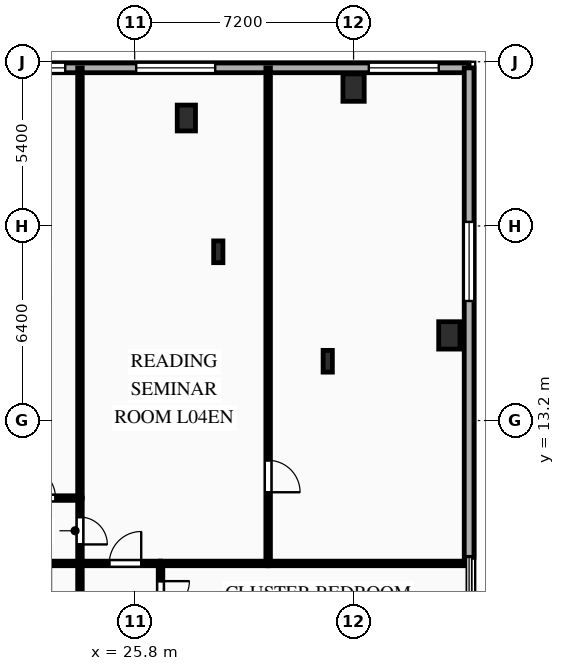
"""IFC4 building model, lengths in metres.
Left out: names, types, materials, properties, quantities, classifications, styles, units other than length and angle.
Written with IfcOpenShell. Run it as: python <this file> out.ifc"""

import sys

from ifc_helpers import new_model, si_unit, direction, frame, frame_2d, origin, origin_2d, place, context, subcontext, project, spatial, rectangle, i_section, extrude, element, fill, save


model = new_model("IFC4")
c1 = context("Model", 3, precision=1e-05, world=origin(), true_north=direction((0.0, 1.0)))
c2 = subcontext(c1, "Body", "Model", "MODEL_VIEW")
j1 = project(units=[si_unit("LENGTHUNIT", "METRE"), si_unit("PLANEANGLEUNIT", "RADIAN")], contexts=[c1])
p1 = place(None, origin())
s1 = spatial("IfcSite", under=j1, at=p1, CompositionType="ELEMENT")
p2 = place(p1, origin())
s2 = spatial("IfcBuilding", under=s1, at=p2, CompositionType="ELEMENT")
p3 = place(p2, frame((0.0, 0.0, 18.0)))
s3 = spatial("IfcBuildingStorey", under=s2, at=p3, CompositionType="ELEMENT", Elevation=18.0)
for number, where, z_axis, x_axis in (
    (1, (33.0, 24.15, 0.0), (0.0, 0.0, 1.0), (1.0, 0.0, 0.0)),
    (2, (36.15, 16.0, 0.0), (0.0, 0.0, 1.0), (1.0, 0.0, 0.0)),
):
    element("IfcColumn", number, at=place(p3, frame(where, z_axis=z_axis, x_axis=x_axis)), inside=s3, PredefinedType="COLUMN", context=c2, shape_type="SweptSolid", body=[
        extrude(rectangle(XDim=0.7, YDim=0.9, at=origin_2d()), origin(), (0.0, 0.0, 1.0), 4.5),
    ])
p4 = place(p3, frame((27.5, 23.15, 0.0), z_axis=(0.0, 0.0, 1.0), x_axis=(1.0, 0.0, 0.0)))
e3 = element("IfcColumn", 3, at=p4, inside=s3, PredefinedType="PILASTER", context=c2, shape_type="SweptSolid", body=[
    extrude(rectangle(XDim=0.6, YDim=0.85, at=origin_2d()), origin(), (0.0, 0.0, 1.0), 4.5),
])
for number, where, z_axis, x_axis in (
    (4, (28.55, 18.75, 0.0), (0.0, 0.0, 1.0), (1.0, 0.0, 0.0)),
    (5, (32.15, 15.15, 0.0), (0.0, 0.0, 1.0), (1.0, 0.0, 0.0)),
):
    element("IfcColumn", number, at=place(p3, frame(where, z_axis=z_axis, x_axis=x_axis)), inside=s3, PredefinedType="COLUMN", context=c2, shape_type="SweptSolid", body=[
        extrude(i_section(OverallWidth=0.304, OverallDepth=0.716, WebThickness=0.021, FlangeThickness=0.04, FilletRadius=0.027, at=origin_2d()), origin(), (0.0, 0.0, 1.0), 4.5),
    ])
p5 = place(p3, frame((-36.8, 24.8, 0.0), z_axis=(0.0, 0.0, 1.0), x_axis=(1.0, 0.0, 0.0)))
e6 = element("IfcWall", 6, at=p5, inside=s3, PredefinedType="SOLIDWALL", context=c2, shape_type="SweptSolid", body=[
    extrude(rectangle(XDim=73.6, YDim=0.32, at=frame_2d((36.8, 0.0))), origin(), (0.0, 0.0, 1.0), 4.17),
])
p6 = place(p5, frame((1.079, 0.0, 0.85)))
e7 = element("IfcOpeningElement", 7, at=p6, cuts=e6, PredefinedType="OPENING", context=c2, shape_type="SweptSolid", body=[
    extrude(rectangle(XDim=2.3, YDim=2.4, at=frame_2d((1.15, 1.2))), frame((0.0, 0.17, 0.0), z_axis=(0.0, -1.0, 0.0), x_axis=(1.0, 0.0, 0.0)), (0.0, 0.0, 1.0), 0.34),
])
p7 = place(p5, frame((8.431, 0.0, 0.85)))
e8 = element("IfcOpeningElement", 8, at=p7, cuts=e6, PredefinedType="OPENING", context=c2, shape_type="SweptSolid", body=[
    extrude(rectangle(XDim=2.6, YDim=2.4, at=frame_2d((1.3, 1.2))), frame((0.0, 0.17, 0.0), z_axis=(0.0, -1.0, 0.0), x_axis=(1.0, 0.0, 0.0)), (0.0, 0.0, 1.0), 0.34),
])
p8 = place(p5, frame((15.168, 0.0, 0.85)))
e9 = element("IfcOpeningElement", 9, at=p8, cuts=e6, PredefinedType="OPENING", context=c2, shape_type="SweptSolid", body=[
    extrude(rectangle(XDim=1.1, YDim=1.85, at=frame_2d((0.55, 0.925))), frame((0.0, 0.17, 0.0), z_axis=(0.0, -1.0, 0.0), x_axis=(1.0, 0.0, 0.0)), (0.0, 0.0, 1.0), 0.34),
])
p9 = place(p5, frame((17.521, 0.0, 0.85)))
e10 = element("IfcOpeningElement", 10, at=p9, cuts=e6, PredefinedType="OPENING", context=c2, shape_type="SweptSolid", body=[
    extrude(rectangle(XDim=2.6, YDim=2.4, at=frame_2d((1.3, 1.2))), frame((0.0, 0.17, 0.0), z_axis=(0.0, -1.0, 0.0), x_axis=(1.0, 0.0, 0.0)), (0.0, 0.0, 1.0), 0.34),
])
p10 = place(p5, frame((26.246, 0.0, 0.85)))
e11 = element("IfcOpeningElement", 11, at=p10, cuts=e6, PredefinedType="OPENING", context=c2, shape_type="SweptSolid", body=[
    extrude(rectangle(XDim=2.0, YDim=2.4, at=frame_2d((1.0, 1.2))), frame((0.0, 0.17, 0.0), z_axis=(0.0, -1.0, 0.0), x_axis=(1.0, 0.0, 0.0)), (0.0, 0.0, 1.0), 0.34),
])
p11 = place(p5, frame((31.536, 0.0, 0.85)))
e12 = element("IfcOpeningElement", 12, at=p11, cuts=e6, PredefinedType="OPENING", context=c2, shape_type="SweptSolid", body=[
    extrude(rectangle(XDim=2.6, YDim=2.4, at=frame_2d((1.3, 1.2))), frame((0.0, 0.17, 0.0), z_axis=(0.0, -1.0, 0.0), x_axis=(1.0, 0.0, 0.0)), (0.0, 0.0, 1.0), 0.34),
])
p12 = place(p5, frame((39.544, 0.0, 0.85)))
e13 = element("IfcOpeningElement", 13, at=p12, cuts=e6, PredefinedType="OPENING", context=c2, shape_type="SweptSolid", body=[
    extrude(rectangle(XDim=2.6, YDim=2.4, at=frame_2d((1.3, 1.2))), frame((0.0, 0.17, 0.0), z_axis=(0.0, -1.0, 0.0), x_axis=(1.0, 0.0, 0.0)), (0.0, 0.0, 1.0), 0.34),
])
p13 = place(p5, frame((48.298, 0.0, 0.85)))
e14 = element("IfcOpeningElement", 14, at=p13, cuts=e6, PredefinedType="OPENING", context=c2, shape_type="SweptSolid", body=[
    extrude(rectangle(XDim=2.6, YDim=2.4, at=frame_2d((1.3, 1.2))), frame((0.0, 0.17, 0.0), z_axis=(0.0, -1.0, 0.0), x_axis=(1.0, 0.0, 0.0)), (0.0, 0.0, 1.0), 0.34),
])
p14 = place(p5, frame((53.56, 0.0, 0.85)))
e15 = element("IfcOpeningElement", 15, at=p14, cuts=e6, PredefinedType="OPENING", context=c2, shape_type="SweptSolid", body=[
    extrude(rectangle(XDim=2.6, YDim=2.4, at=frame_2d((1.3, 1.2))), frame((0.0, 0.17, 0.0), z_axis=(0.0, -1.0, 0.0), x_axis=(1.0, 0.0, 0.0)), (0.0, 0.0, 1.0), 0.34),
])
p15 = place(p5, frame((59.216, 0.0, 0.85)))
e16 = element("IfcOpeningElement", 16, at=p15, cuts=e6, PredefinedType="OPENING", context=c2, shape_type="SweptSolid", body=[
    extrude(rectangle(XDim=1.1, YDim=1.85, at=frame_2d((0.55, 0.925))), frame((0.0, 0.17, 0.0), z_axis=(0.0, -1.0, 0.0), x_axis=(1.0, 0.0, 0.0)), (0.0, 0.0, 1.0), 0.34),
])
p16 = place(p5, frame((62.649, 0.0, 0.85)))
e17 = element("IfcOpeningElement", 17, at=p16, cuts=e6, PredefinedType="OPENING", context=c2, shape_type="SweptSolid", body=[
    extrude(rectangle(XDim=2.6, YDim=2.4, at=frame_2d((1.3, 1.2))), frame((0.0, 0.17, 0.0), z_axis=(0.0, -1.0, 0.0), x_axis=(1.0, 0.0, 0.0)), (0.0, 0.0, 1.0), 0.34),
])
p17 = place(p5, frame((70.301, 0.0, 0.85)))
e18 = element("IfcOpeningElement", 18, at=p17, cuts=e6, PredefinedType="OPENING", context=c2, shape_type="SweptSolid", body=[
    extrude(rectangle(XDim=2.3, YDim=2.4, at=frame_2d((1.15, 1.2))), frame((0.0, 0.17, 0.0), z_axis=(0.0, -1.0, 0.0), x_axis=(1.0, 0.0, 0.0)), (0.0, 0.0, 1.0), 0.34),
])
p18 = place(p3, frame((36.8, 24.8, 0.0), z_axis=(0.0, 0.0, 1.0), x_axis=(0.0, -1.0, 0.0)))
e19 = element("IfcWall", 19, at=p18, inside=s3, PredefinedType="SOLIDWALL", context=c2, shape_type="SweptSolid", body=[
    extrude(rectangle(XDim=16.1, YDim=0.32, at=frame_2d((8.05, 0.0))), origin(), (0.0, 0.0, 1.0), 4.17),
])
p19 = place(p18, frame((5.067, 0.0, 0.85)))
e20 = element("IfcOpeningElement", 20, at=p19, cuts=e19, PredefinedType="OPENING", context=c2, shape_type="SweptSolid", body=[
    extrude(rectangle(XDim=2.6, YDim=2.4, at=frame_2d((1.3, 1.2))), frame((0.0, 0.17, 0.0), z_axis=(0.0, -1.0, 0.0), x_axis=(1.0, 0.0, 0.0)), (0.0, 0.0, 1.0), 0.34),
])
p20 = place(p3, frame((24.0, 10.65, 0.0), z_axis=(0.0, 0.0, 1.0), x_axis=(0.0, -1.0, 0.0)))
e21 = element("IfcWall", 21, at=p20, inside=s3, PredefinedType="PARTITIONING", context=c2, shape_type="SweptSolid", body=[
    extrude(rectangle(XDim=2.15, YDim=0.15, at=frame_2d((1.075, 0.0))), origin(), (0.0, 0.0, 1.0), 4.17),
])
p21 = place(p20, frame((0.625, 0.0, 0.0)))
e22 = element("IfcOpeningElement", 22, at=p21, cuts=e21, PredefinedType="OPENING", context=c2, shape_type="SweptSolid", body=[
    extrude(rectangle(XDim=0.9, YDim=2.1, at=frame_2d((0.45, 1.05))), frame((0.0, 0.085, 0.0), z_axis=(0.0, -1.0, 0.0), x_axis=(1.0, 0.0, 0.0)), (0.0, 0.0, 1.0), 0.17),
])
p22 = place(p3, frame((24.0, 8.5, 0.0), z_axis=(0.0, 0.0, 1.0), x_axis=(-1.0, 0.0, 0.0)))
e23 = element("IfcWall", 23, at=p22, inside=s3, PredefinedType="PARTITIONING", context=c2, shape_type="SweptSolid", body=[
    extrude(rectangle(XDim=5.2, YDim=0.15, at=frame_2d((2.6, 0.0))), origin(), (0.0, 0.0, 1.0), 4.17),
])
p23 = place(p22, frame((0.954, 0.0, 0.0)))
e24 = element("IfcOpeningElement", 24, at=p23, cuts=e23, PredefinedType="OPENING", context=c2, shape_type="SweptSolid", body=[
    extrude(rectangle(XDim=1.05, YDim=2.15, at=frame_2d((0.525, 1.075))), frame((0.0, 0.085, 0.0), z_axis=(0.0, -1.0, 0.0), x_axis=(1.0, 0.0, 0.0)), (0.0, 0.0, 1.0), 0.17),
])
p24 = place(p3, frame((20.0, 10.65, 0.0), z_axis=(0.0, 0.0, 1.0), x_axis=(1.0, 0.0, 0.0)))
e25 = element("IfcWall", 25, at=p24, inside=s3, PredefinedType="PARTITIONING", context=c2, shape_type="SweptSolid", body=[
    extrude(rectangle(XDim=4.0, YDim=0.15, at=frame_2d((2.0, 0.0))), origin(), (0.0, 0.0, 1.0), 4.17),
])
p25 = place(p24, frame((2.146, 0.0, 0.0)))
e26 = element("IfcOpeningElement", 26, at=p25, cuts=e25, PredefinedType="OPENING", context=c2, shape_type="SweptSolid", body=[
    extrude(rectangle(XDim=1.05, YDim=2.15, at=frame_2d((0.525, 1.075))), frame((0.0, 0.085, 0.0), z_axis=(0.0, -1.0, 0.0), x_axis=(1.0, 0.0, 0.0)), (0.0, 0.0, 1.0), 0.17),
])
p26 = place(p3, frame((24.0, 8.5, 0.0), z_axis=(0.0, 0.0, 1.0), x_axis=(1.0, 0.0, 0.0)))
e27 = element("IfcWall", 27, at=p26, inside=s3, PredefinedType="PARTITIONING", context=c2, shape_type="SweptSolid", body=[
    extrude(rectangle(XDim=2.65, YDim=0.15, at=frame_2d((1.325, 0.0))), origin(), (0.0, 0.0, 1.0), 4.17),
])
p27 = place(p26, frame((0.965, 0.0, 0.0)))
e28 = element("IfcOpeningElement", 28, at=p27, cuts=e27, PredefinedType="OPENING", context=c2, shape_type="SweptSolid", body=[
    extrude(rectangle(XDim=1.05, YDim=2.15, at=frame_2d((0.525, 1.075))), frame((0.0, 0.085, 0.0), z_axis=(0.0, -1.0, 0.0), x_axis=(1.0, 0.0, 0.0)), (0.0, 0.0, 1.0), 0.17),
])
p28 = place(p3, frame((26.65, 8.5, 0.0), z_axis=(0.0, 0.0, 1.0), x_axis=(0.0, -1.0, 0.0)))
e29 = element("IfcWall", 29, at=p28, inside=s3, PredefinedType="PARTITIONING", context=c2, shape_type="SweptSolid", body=[
    extrude(rectangle(XDim=2.115, YDim=0.15, at=frame_2d((1.058, 0.0))), origin(), (0.0, 0.0, 1.0), 4.17),
])
p29 = place(p28, frame((0.583, 0.0, 0.0)))
e30 = element("IfcOpeningElement", 30, at=p29, cuts=e29, PredefinedType="OPENING", context=c2, shape_type="SweptSolid", body=[
    extrude(rectangle(XDim=0.95, YDim=2.1, at=frame_2d((0.475, 1.05))), frame((0.0, 0.085, 0.0), z_axis=(0.0, -1.0, 0.0), x_axis=(1.0, 0.0, 0.0)), (0.0, 0.0, 1.0), 0.17),
])
p30 = place(p3, frame((24.0, -5.6, 0.0), z_axis=(0.0, 0.0, 1.0), x_axis=(0.0, 1.0, 0.0)))
e31 = element("IfcWall", 31, at=p30, inside=s3, PredefinedType="PARTITIONING", context=c2, shape_type="SweptSolid", body=[
    extrude(rectangle(XDim=14.1, YDim=0.15, at=frame_2d((7.05, 0.0))), origin(), (0.0, 0.0, 1.0), 4.17),
])
p31 = place(p3, frame((30.19, 24.8, 0.0), z_axis=(0.0, 0.0, 1.0), x_axis=(0.0, -1.0, 0.0)))
e32 = element("IfcWall", 32, at=p31, inside=s3, PredefinedType="PARTITIONING", context=c2, shape_type="SweptSolid", body=[
    extrude(rectangle(XDim=16.3, YDim=0.15, at=frame_2d((8.15, 0.0))), origin(), (0.0, 0.0, 1.0), 4.17),
])
p32 = place(p31, frame((12.909, 0.0, 0.0)))
e33 = element("IfcOpeningElement", 33, at=p32, cuts=e32, PredefinedType="OPENING", context=c2, shape_type="SweptSolid", body=[
    extrude(rectangle(XDim=1.05, YDim=2.15, at=frame_2d((0.525, 1.075))), frame((0.0, 0.085, 0.0), z_axis=(0.0, -1.0, 0.0), x_axis=(1.0, 0.0, 0.0)), (0.0, 0.0, 1.0), 0.17),
])
p33 = place(p3, frame((30.19, 8.5, 0.0), z_axis=(0.0, 0.0, 1.0), x_axis=(-1.0, 0.0, 0.0)))
e34 = element("IfcWall", 34, at=p33, inside=s3, PredefinedType="PARTITIONING", context=c2, shape_type="SweptSolid", body=[
    extrude(rectangle(XDim=3.54, YDim=0.15, at=frame_2d((1.77, 0.0))), origin(), (0.0, 0.0, 1.0), 4.17),
])
p34 = place(p3, frame((24.0, 10.65, 0.0), z_axis=(0.0, 0.0, 1.0), x_axis=(0.0, 1.0, 0.0)))
e35 = element("IfcWall", 35, at=p34, inside=s3, PredefinedType="PARTITIONING", context=c2, shape_type="SweptSolid", body=[
    extrude(rectangle(XDim=14.15, YDim=0.15, at=frame_2d((7.075, 0.0))), origin(), (0.0, 0.0, 1.0), 4.17),
])
p35 = place(p3, frame((36.8, 8.5, 0.0), z_axis=(0.0, 0.0, 1.0), x_axis=(-1.0, 0.0, 0.0)))
e36 = element("IfcWall", 36, at=p35, inside=s3, PredefinedType="PARTITIONING", context=c2, shape_type="SweptSolid", body=[
    extrude(rectangle(XDim=6.61, YDim=0.15, at=frame_2d((3.305, 0.0))), origin(), (0.0, 0.0, 1.0), 4.17),
])
p36 = place(p15, origin())
e37 = element("IfcWindow", 37, at=p36, inside=s3, PartitioningType="SINGLE_PANEL", PredefinedType="WINDOW", context=c2, shape_type="SweptSolid", body=[
    extrude(rectangle(XDim=1.1, YDim=1.85, at=frame_2d((0.55, 0.925))), frame((0.0, 0.03, 0.0), z_axis=(0.0, -1.0, 0.0), x_axis=(1.0, 0.0, 0.0)), (0.0, 0.0, 1.0), 0.06),
])
fill(e16, e37)
p37 = place(p16, origin())
e38 = element("IfcWindow", 38, at=p37, inside=s3, PartitioningType="SINGLE_PANEL", PredefinedType="WINDOW", context=c2, shape_type="SweptSolid", body=[
    extrude(rectangle(XDim=2.6, YDim=2.4, at=frame_2d((1.3, 1.2))), frame((0.0, 0.03, 0.0), z_axis=(0.0, -1.0, 0.0), x_axis=(1.0, 0.0, 0.0)), (0.0, 0.0, 1.0), 0.06),
])
fill(e17, e38)
p38 = place(p17, origin())
e39 = element("IfcWindow", 39, at=p38, inside=s3, PartitioningType="SINGLE_PANEL", PredefinedType="WINDOW", context=c2, shape_type="SweptSolid", body=[
    extrude(rectangle(XDim=2.3, YDim=2.4, at=frame_2d((1.15, 1.2))), frame((0.0, 0.03, 0.0), z_axis=(0.0, -1.0, 0.0), x_axis=(1.0, 0.0, 0.0)), (0.0, 0.0, 1.0), 0.06),
])
fill(e18, e39)
p39 = place(p19, origin())
e40 = element("IfcWindow", 40, at=p39, inside=s3, PartitioningType="SINGLE_PANEL", PredefinedType="WINDOW", context=c2, shape_type="SweptSolid", body=[
    extrude(rectangle(XDim=2.6, YDim=2.4, at=frame_2d((1.3, 1.2))), frame((0.0, 0.03, 0.0), z_axis=(0.0, -1.0, 0.0), x_axis=(1.0, 0.0, 0.0)), (0.0, 0.0, 1.0), 0.06),
])
fill(e20, e40)
p40 = place(p21, origin())
e41 = element("IfcDoor", 41, at=p40, inside=s3, OperationType="SINGLE_SWING_RIGHT", PredefinedType="DOOR", context=c2, shape_type="SweptSolid", body=[
    extrude(rectangle(XDim=0.9, YDim=2.1, at=frame_2d((0.45, 1.05))), frame((0.0, 0.025, 0.0), z_axis=(0.0, -1.0, 0.0), x_axis=(1.0, 0.0, 0.0)), (0.0, 0.0, 1.0), 0.05),
])
fill(e22, e41)
p41 = place(p25, origin())
e42 = element("IfcDoor", 42, at=p41, inside=s3, OperationType="SINGLE_SWING_LEFT", PredefinedType="DOOR", context=c2, shape_type="SweptSolid", body=[
    extrude(rectangle(XDim=1.05, YDim=2.15, at=frame_2d((0.525, 1.075))), frame((0.0, 0.025, 0.0), z_axis=(0.0, -1.0, 0.0), x_axis=(1.0, 0.0, 0.0)), (0.0, 0.0, 1.0), 0.05),
])
fill(e26, e42)
p42 = place(p27, origin())
e43 = element("IfcDoor", 43, at=p42, inside=s3, OperationType="SINGLE_SWING_RIGHT", PredefinedType="DOOR", context=c2, shape_type="SweptSolid", body=[
    extrude(rectangle(XDim=1.05, YDim=2.15, at=frame_2d((0.525, 1.075))), frame((0.0, 0.025, 0.0), z_axis=(0.0, -1.0, 0.0), x_axis=(1.0, 0.0, 0.0)), (0.0, 0.0, 1.0), 0.05),
])
fill(e28, e43)
p43 = place(p29, origin())
e44 = element("IfcDoor", 44, at=p43, inside=s3, OperationType="SINGLE_SWING_LEFT", PredefinedType="DOOR", context=c2, shape_type="SweptSolid", body=[
    extrude(rectangle(XDim=0.95, YDim=2.1, at=frame_2d((0.475, 1.05))), frame((0.0, 0.025, 0.0), z_axis=(0.0, -1.0, 0.0), x_axis=(1.0, 0.0, 0.0)), (0.0, 0.0, 1.0), 0.05),
])
fill(e30, e44)
p44 = place(p32, origin())
e45 = element("IfcDoor", 45, at=p44, inside=s3, OperationType="SINGLE_SWING_RIGHT", PredefinedType="DOOR", context=c2, shape_type="SweptSolid", body=[
    extrude(rectangle(XDim=1.05, YDim=2.15, at=frame_2d((0.525, 1.075))), frame((0.0, 0.025, 0.0), z_axis=(0.0, -1.0, 0.0), x_axis=(1.0, 0.0, 0.0)), (0.0, 0.0, 1.0), 0.05),
])
fill(e33, e45)
save(model, sys.argv[1])
